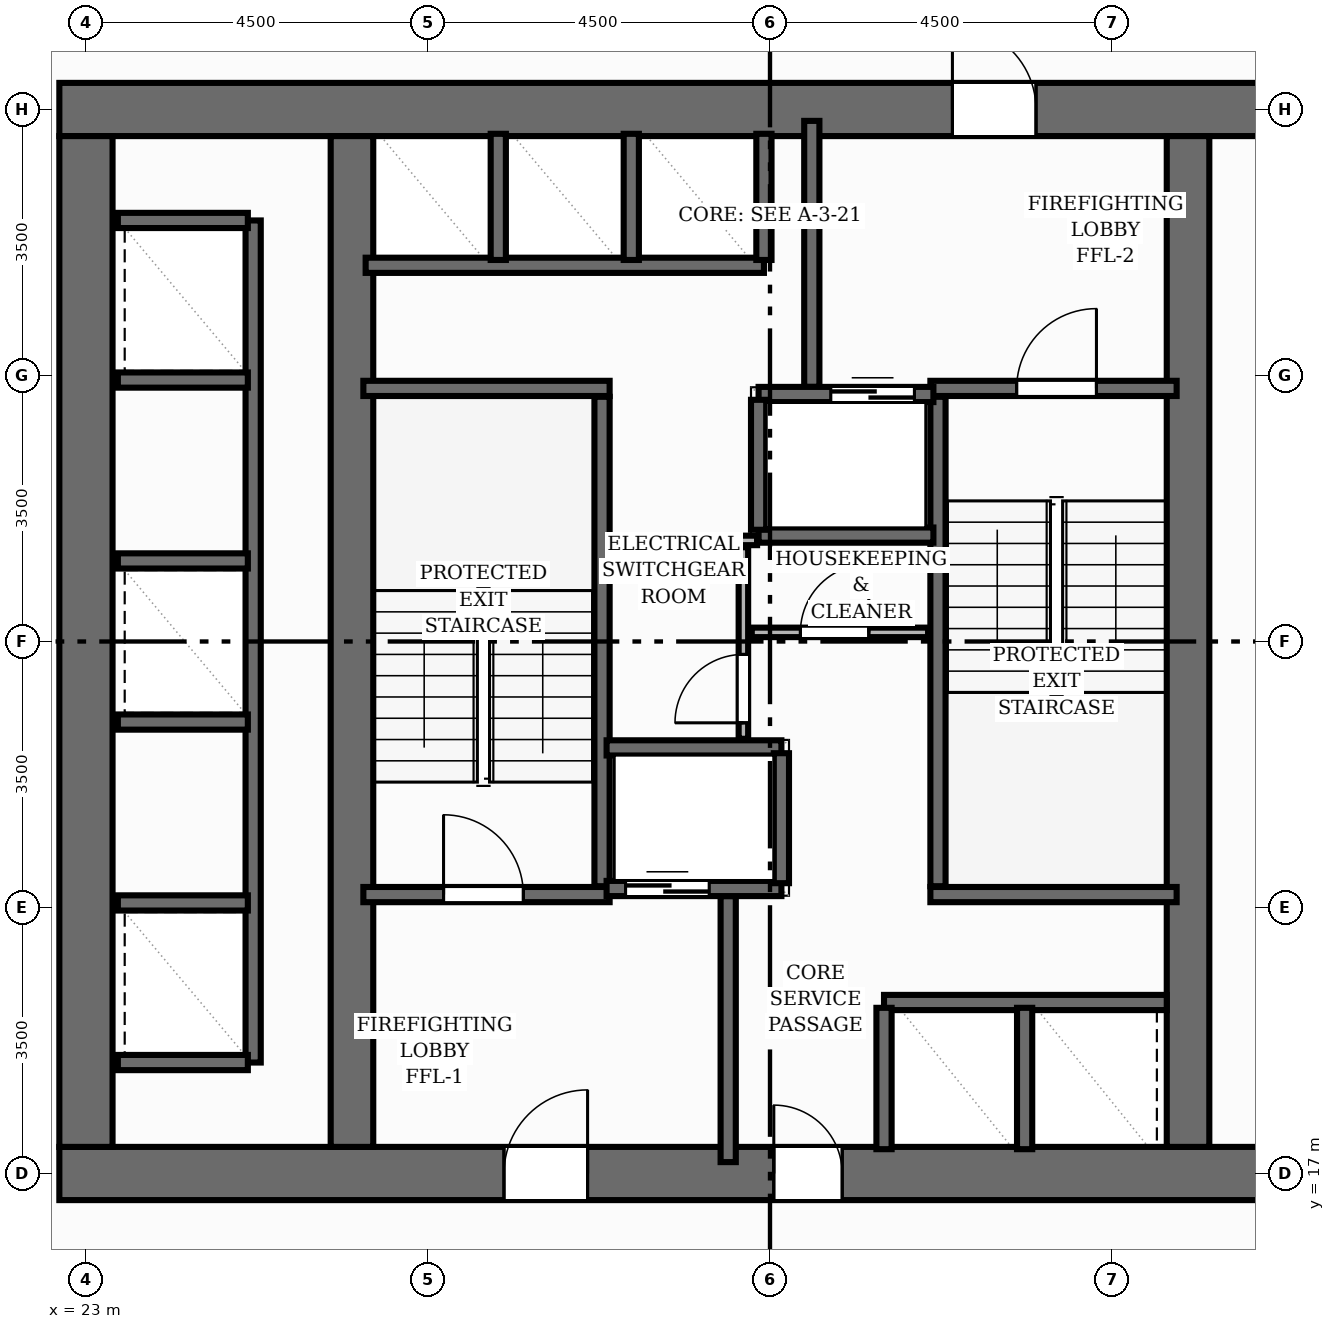
"""IFC4 building model, lengths in metres.
Left out: names, types, materials, properties, quantities, classifications, styles, units other than length and angle.
Written with IfcOpenShell. Run it as: python <this file> out.ifc"""

import sys

from ifc_helpers import new_model, si_unit, direction, frame, frame_2d, origin, place, context, subcontext, project, spatial, rectangle, extrude, element, fill, save


model = new_model("IFC4")
c1 = context("Model", 3, precision=1e-05, world=origin(), true_north=direction((0.0, 1.0)))
c2 = subcontext(c1, "Body", "Model", "MODEL_VIEW")
j1 = project(units=[si_unit("LENGTHUNIT", "METRE"), si_unit("PLANEANGLEUNIT", "RADIAN")], contexts=[c1])
p1 = place(None, origin())
s1 = spatial("IfcSite", under=j1, at=p1, CompositionType="ELEMENT")
p2 = place(p1, origin())
s2 = spatial("IfcBuilding", under=s1, at=p2, CompositionType="ELEMENT")
p3 = place(p2, frame((0.0, 0.0, 77.28)))
s3 = spatial("IfcBuildingStorey", under=s2, at=p3, CompositionType="ELEMENT", Elevation=77.28)
p4 = place(p3, frame((22.65, 17.0, 0.0), z_axis=(0.0, 0.0, 1.0), x_axis=(1.0, 0.0, 0.0)))
e1 = element("IfcWall", 1, at=p4, inside=s3, PredefinedType="SHEAR", context=c2, shape_type="SweptSolid", body=[
    extrude(rectangle(XDim=18.7, YDim=0.7, at=frame_2d((9.35, 0.0))), origin(), (0.0, 0.0, 1.0), 3.2),
])
p5 = place(p4, frame((5.85, 0.0, 0.0)))
e2 = element("IfcOpeningElement", 2, at=p5, cuts=e1, PredefinedType="OPENING", context=c2, shape_type="SweptSolid", body=[
    extrude(rectangle(XDim=1.1, YDim=2.15, at=frame_2d((0.55, 1.075))), frame((0.0, 0.36, 0.0), z_axis=(0.0, -1.0, 0.0), x_axis=(1.0, 0.0, 0.0)), (0.0, 0.0, 1.0), 0.72),
])
p6 = place(p4, frame((9.4, 0.0, 0.0)))
e3 = element("IfcOpeningElement", 3, at=p6, cuts=e1, PredefinedType="OPENING", context=c2, shape_type="SweptSolid", body=[
    extrude(rectangle(XDim=0.9, YDim=2.1, at=frame_2d((0.45, 1.05))), frame((0.0, 0.36, 0.0), z_axis=(0.0, -1.0, 0.0), x_axis=(1.0, 0.0, 0.0)), (0.0, 0.0, 1.0), 0.72),
])
p7 = place(p3, frame((22.65, 31.0, 0.0), z_axis=(0.0, 0.0, 1.0), x_axis=(1.0, 0.0, 0.0)))
e4 = element("IfcWall", 4, at=p7, inside=s3, PredefinedType="SHEAR", context=c2, shape_type="SweptSolid", body=[
    extrude(rectangle(XDim=18.7, YDim=0.7, at=frame_2d((9.35, 0.0))), origin(), (0.0, 0.0, 1.0), 3.2),
])
p8 = place(p7, frame((11.75, 0.0, 0.0)))
e5 = element("IfcOpeningElement", 5, at=p8, cuts=e4, PredefinedType="OPENING", context=c2, shape_type="SweptSolid", body=[
    extrude(rectangle(XDim=1.1, YDim=2.15, at=frame_2d((0.55, 1.075))), frame((0.0, 0.36, 0.0), z_axis=(0.0, -1.0, 0.0), x_axis=(1.0, 0.0, 0.0)), (0.0, 0.0, 1.0), 0.72),
])
p9 = place(p3, frame((23.0, 17.35, 0.0), z_axis=(0.0, 0.0, 1.0), x_axis=(0.0, 1.0, 0.0)))
e6 = element("IfcWall", 6, at=p9, inside=s3, PredefinedType="SHEAR", context=c2, shape_type="SweptSolid", body=[
    extrude(rectangle(XDim=13.3, YDim=0.7, at=frame_2d((6.65, 0.0))), origin(), (0.0, 0.0, 1.0), 3.2),
])
for number, where, z_axis, x_axis in (
    (7, (26.5, 17.35, 0.0), (0.0, 0.0, 1.0), (0.0, 1.0, 0.0)),
    (8, (37.5, 17.35, 0.0), (0.0, 0.0, 1.0), (0.0, 1.0, 0.0)),
):
    element("IfcWall", number, at=place(p3, frame(where, z_axis=z_axis, x_axis=x_axis)), inside=s3, PredefinedType="SHEAR", context=c2, shape_type="SweptSolid", body=[
        extrude(rectangle(XDim=13.3, YDim=0.56, at=frame_2d((6.65, 0.0))), origin(), (0.0, 0.0, 1.0), 3.2),
    ])
p10 = place(p3, frame((29.79, 20.78, 0.0), z_axis=(0.0, 0.0, 1.0), x_axis=(0.0, 1.0, 0.0)))
e9 = element("IfcWall", 9, at=p10, inside=s3, PredefinedType="SHEAR", context=c2, shape_type="SweptSolid", body=[
    extrude(rectangle(XDim=6.44, YDim=0.2, at=frame_2d((3.22, 0.0))), origin(), (0.0, 0.0, 1.0), 3.2),
])
p11 = place(p3, frame((26.65, 27.33, 0.0), z_axis=(0.0, 0.0, 1.0), x_axis=(1.0, 0.0, 0.0)))
e10 = element("IfcWall", 10, at=p11, inside=s3, PredefinedType="SHEAR", context=c2, shape_type="SweptSolid", body=[
    extrude(rectangle(XDim=3.24, YDim=0.2, at=frame_2d((1.62, 0.0))), origin(), (0.0, 0.0, 1.0), 3.2),
])
p12 = place(p3, frame((26.65, 20.67, 0.0), z_axis=(0.0, 0.0, 1.0), x_axis=(1.0, 0.0, 0.0)))
e11 = element("IfcWall", 11, at=p12, inside=s3, PredefinedType="SHEAR", context=c2, shape_type="SweptSolid", body=[
    extrude(rectangle(XDim=3.24, YDim=0.2, at=frame_2d((1.62, 0.0))), origin(), (0.0, 0.0, 1.0), 3.2),
])
p13 = place(p12, frame((1.055, 0.0, 0.0)))
e12 = element("IfcOpeningElement", 12, at=p13, cuts=e11, PredefinedType="OPENING", context=c2, shape_type="SweptSolid", body=[
    extrude(rectangle(XDim=1.05, YDim=2.15, at=frame_2d((0.525, 1.075))), frame((0.0, 0.11, 0.0), z_axis=(0.0, -1.0, 0.0), x_axis=(1.0, 0.0, 0.0)), (0.0, 0.0, 1.0), 0.22),
])
p14 = place(p3, frame((34.21, 20.78, 0.0), z_axis=(0.0, 0.0, 1.0), x_axis=(0.0, 1.0, 0.0)))
e13 = element("IfcWall", 13, at=p14, inside=s3, PredefinedType="SHEAR", context=c2, shape_type="SweptSolid", body=[
    extrude(rectangle(XDim=6.44, YDim=0.2, at=frame_2d((3.22, 0.0))), origin(), (0.0, 0.0, 1.0), 3.2),
])
p15 = place(p3, frame((34.11, 20.67, 0.0), z_axis=(0.0, 0.0, 1.0), x_axis=(1.0, 0.0, 0.0)))
e14 = element("IfcWall", 14, at=p15, inside=s3, PredefinedType="SHEAR", context=c2, shape_type="SweptSolid", body=[
    extrude(rectangle(XDim=3.24, YDim=0.2, at=frame_2d((1.62, 0.0))), origin(), (0.0, 0.0, 1.0), 3.2),
])
p16 = place(p3, frame((34.11, 27.33, 0.0), z_axis=(0.0, 0.0, 1.0), x_axis=(1.0, 0.0, 0.0)))
e15 = element("IfcWall", 15, at=p16, inside=s3, PredefinedType="SHEAR", context=c2, shape_type="SweptSolid", body=[
    extrude(rectangle(XDim=3.24, YDim=0.2, at=frame_2d((1.62, 0.0))), origin(), (0.0, 0.0, 1.0), 3.2),
])
p17 = place(p16, frame((1.135, 0.0, 0.0)))
e16 = element("IfcOpeningElement", 16, at=p17, cuts=e15, PredefinedType="OPENING", context=c2, shape_type="SweptSolid", body=[
    extrude(rectangle(XDim=1.05, YDim=2.15, at=frame_2d((0.525, 1.075))), frame((0.0, 0.11, 0.0), z_axis=(0.0, -1.0, 0.0), x_axis=(1.0, 0.0, 0.0)), (0.0, 0.0, 1.0), 0.22),
])
for number, where, z_axis, x_axis in (
    (17, (31.45, 17.15, 0.0), (0.0, 0.0, 1.0), (0.0, 1.0, 0.0)),
    (18, (32.55, 27.35, 0.0), (0.0, 0.0, 1.0), (0.0, 1.0, 0.0)),
):
    element("IfcWall", number, at=place(p3, frame(where, z_axis=z_axis, x_axis=x_axis)), inside=s3, PredefinedType="SHEAR", context=c2, shape_type="SweptSolid", body=[
        extrude(rectangle(XDim=3.5, YDim=0.2, at=frame_2d((1.75, 0.0))), origin(), (0.0, 0.0, 1.0), 3.2),
    ])
p18 = place(p3, frame((29.85, 20.75, 0.0), z_axis=(0.0, 0.0, 1.0), x_axis=(1.0, 0.0, 0.0)))
e19 = element("IfcWall", 19, at=p18, inside=s3, PredefinedType="SHEAR", context=c2, shape_type="SweptSolid", body=[
    extrude(rectangle(XDim=2.3, YDim=0.2, at=frame_2d((1.15, 0.0))), origin(), (0.0, 0.0, 1.0), 3.2),
])
p19 = place(p18, frame((0.25, 0.0, 0.0)))
e20 = element("IfcOpeningElement", 20, at=p19, cuts=e19, PredefinedType="OPENING", context=c2, shape_type="SweptSolid", body=[
    extrude(rectangle(XDim=1.1, YDim=2.15, at=frame_2d((0.55, 1.075))), frame((0.0, 0.11, 0.0), z_axis=(0.0, -1.0, 0.0), x_axis=(1.0, 0.0, 0.0)), (0.0, 0.0, 1.0), 0.22),
])
p20 = place(p3, frame((29.85, 22.6, 0.0), z_axis=(0.0, 0.0, 1.0), x_axis=(1.0, 0.0, 0.0)))
e21 = element("IfcWall", 21, at=p20, inside=s3, PredefinedType="SHEAR", context=c2, shape_type="SweptSolid", body=[
    extrude(rectangle(XDim=2.3, YDim=0.2, at=frame_2d((1.15, 0.0))), origin(), (0.0, 0.0, 1.0), 3.2),
])
p21 = place(p3, frame((32.15, 20.82, 0.0), z_axis=(0.0, 0.0, 1.0), x_axis=(0.0, 1.0, 0.0)))
e22 = element("IfcWall", 22, at=p21, inside=s3, PredefinedType="SHEAR", context=c2, shape_type="SweptSolid", body=[
    extrude(rectangle(XDim=1.71, YDim=0.2, at=frame_2d((0.855, 0.0))), origin(), (0.0, 0.0, 1.0), 3.2),
])
p22 = place(p3, frame((31.85, 27.25, 0.0), z_axis=(0.0, 0.0, 1.0), x_axis=(1.0, 0.0, 0.0)))
e23 = element("IfcWall", 23, at=p22, inside=s3, PredefinedType="SHEAR", context=c2, shape_type="SweptSolid", body=[
    extrude(rectangle(XDim=2.3, YDim=0.2, at=frame_2d((1.15, 0.0))), origin(), (0.0, 0.0, 1.0), 3.2),
])
p23 = place(p22, frame((0.95, 0.0, 0.0)))
e24 = element("IfcOpeningElement", 24, at=p23, cuts=e23, PredefinedType="OPENING", context=c2, shape_type="SweptSolid", body=[
    extrude(rectangle(XDim=1.1, YDim=2.15, at=frame_2d((0.55, 1.075))), frame((0.0, 0.11, 0.0), z_axis=(0.0, -1.0, 0.0), x_axis=(1.0, 0.0, 0.0)), (0.0, 0.0, 1.0), 0.22),
])
p24 = place(p3, frame((31.85, 25.4, 0.0), z_axis=(0.0, 0.0, 1.0), x_axis=(1.0, 0.0, 0.0)))
e25 = element("IfcWall", 25, at=p24, inside=s3, PredefinedType="SHEAR", context=c2, shape_type="SweptSolid", body=[
    extrude(rectangle(XDim=2.3, YDim=0.2, at=frame_2d((1.15, 0.0))), origin(), (0.0, 0.0, 1.0), 3.2),
])
p25 = place(p3, frame((31.85, 25.47, 0.0), z_axis=(0.0, 0.0, 1.0), x_axis=(0.0, 1.0, 0.0)))
e26 = element("IfcWall", 26, at=p25, inside=s3, PredefinedType="SHEAR", context=c2, shape_type="SweptSolid", body=[
    extrude(rectangle(XDim=1.71, YDim=0.2, at=frame_2d((0.855, 0.0))), origin(), (0.0, 0.0, 1.0), 3.2),
])
p26 = place(p3, frame((25.2, 18.46, 0.0), z_axis=(0.0, 0.0, 1.0), x_axis=(0.0, 1.0, 0.0)))
e27 = element("IfcWall", 27, at=p26, inside=s3, PredefinedType="SHEAR", context=c2, shape_type="SweptSolid", body=[
    extrude(rectangle(XDim=11.08, YDim=0.2, at=frame_2d((5.54, 0.0))), origin(), (0.0, 0.0, 1.0), 3.2),
])
for number, where, z_axis, x_axis in (
    (28, (23.42, 18.46, 0.0), (0.0, 0.0, 1.0), (1.0, 0.0, 0.0)),
    (29, (23.42, 29.54, 0.0), (0.0, 0.0, 1.0), (1.0, 0.0, 0.0)),
    (30, (23.42, 20.56, 0.0), (0.0, 0.0, 1.0), (1.0, 0.0, 0.0)),
    (31, (23.42, 22.94, 0.0), (0.0, 0.0, 1.0), (1.0, 0.0, 0.0)),
    (32, (23.42, 25.06, 0.0), (0.0, 0.0, 1.0), (1.0, 0.0, 0.0)),
    (33, (23.42, 27.44, 0.0), (0.0, 0.0, 1.0), (1.0, 0.0, 0.0)),
):
    element("IfcWall", number, at=place(p3, frame(where, z_axis=z_axis, x_axis=x_axis)), inside=s3, PredefinedType="SHEAR", context=c2, shape_type="SweptSolid", body=[
        extrude(rectangle(XDim=1.71, YDim=0.2, at=frame_2d((0.855, 0.0))), origin(), (0.0, 0.0, 1.0), 3.2),
    ])
p27 = place(p3, frame((26.68, 28.95, 0.0), z_axis=(0.0, 0.0, 1.0), x_axis=(1.0, 0.0, 0.0)))
e34 = element("IfcWall", 34, at=p27, inside=s3, PredefinedType="SHEAR", context=c2, shape_type="SweptSolid", body=[
    extrude(rectangle(XDim=5.24, YDim=0.2, at=frame_2d((2.62, 0.0))), origin(), (0.0, 0.0, 1.0), 3.2),
])
for number, where, z_axis, x_axis in (
    (35, (31.92, 29.02, 0.0), (0.0, 0.0, 1.0), (0.0, 1.0, 0.0)),
    (36, (28.425, 29.02, 0.0), (0.0, 0.0, 1.0), (0.0, 1.0, 0.0)),
    (37, (30.175, 29.02, 0.0), (0.0, 0.0, 1.0), (0.0, 1.0, 0.0)),
):
    element("IfcWall", number, at=place(p3, frame(where, z_axis=z_axis, x_axis=x_axis)), inside=s3, PredefinedType="SHEAR", context=c2, shape_type="SweptSolid", body=[
        extrude(rectangle(XDim=1.66, YDim=0.2, at=frame_2d((0.83, 0.0))), origin(), (0.0, 0.0, 1.0), 3.2),
    ])
p28 = place(p3, frame((33.5, 19.25, 0.0), z_axis=(0.0, 0.0, 1.0), x_axis=(1.0, 0.0, 0.0)))
e38 = element("IfcWall", 38, at=p28, inside=s3, PredefinedType="SHEAR", context=c2, shape_type="SweptSolid", body=[
    extrude(rectangle(XDim=3.72, YDim=0.2, at=frame_2d((1.86, 0.0))), origin(), (0.0, 0.0, 1.0), 3.2),
])
for number, where, z_axis, x_axis in (
    (39, (33.5, 17.32, 0.0), (0.0, 0.0, 1.0), (0.0, 1.0, 0.0)),
    (40, (35.35, 17.32, 0.0), (0.0, 0.0, 1.0), (0.0, 1.0, 0.0)),
):
    element("IfcWall", number, at=place(p3, frame(where, z_axis=z_axis, x_axis=x_axis)), inside=s3, PredefinedType="SHEAR", context=c2, shape_type="SweptSolid", body=[
        extrude(rectangle(XDim=1.86, YDim=0.2, at=frame_2d((0.93, 0.0))), origin(), (0.0, 0.0, 1.0), 3.2),
    ])
p29 = place(p3, frame((31.65, 22.72, 0.0), z_axis=(0.0, 0.0, 1.0), x_axis=(0.0, 1.0, 0.0)))
e41 = element("IfcWall", 41, at=p29, inside=s3, PredefinedType="PARTITIONING", context=c2, shape_type="SweptSolid", body=[
    extrude(rectangle(XDim=2.52, YDim=0.125, at=frame_2d((1.26, 0.0))), origin(), (0.0, 0.0, 1.0), 2.955),
])
p30 = place(p29, frame((0.21, 0.0, 0.0)))
e42 = element("IfcOpeningElement", 42, at=p30, cuts=e41, PredefinedType="OPENING", context=c2, shape_type="SweptSolid", body=[
    extrude(rectangle(XDim=0.9, YDim=2.1, at=frame_2d((0.45, 1.05))), frame((0.0, 0.073, 0.0), z_axis=(0.0, -1.0, 0.0), x_axis=(1.0, 0.0, 0.0)), (0.0, 0.0, 1.0), 0.145),
])
p31 = place(p3, frame((31.76, 24.12, 0.0), z_axis=(0.0, 0.0, 1.0), x_axis=(1.0, 0.0, 0.0)))
e43 = element("IfcWall", 43, at=p31, inside=s3, PredefinedType="PARTITIONING", context=c2, shape_type="SweptSolid", body=[
    extrude(rectangle(XDim=2.32, YDim=0.125, at=frame_2d((1.16, 0.0))), origin(), (0.0, 0.0, 1.0), 2.955),
])
p32 = place(p31, frame((0.64, 0.0, 0.0)))
e44 = element("IfcOpeningElement", 44, at=p32, cuts=e43, PredefinedType="OPENING", context=c2, shape_type="SweptSolid", body=[
    extrude(rectangle(XDim=0.9, YDim=2.1, at=frame_2d((0.45, 1.05))), frame((0.0, 0.073, 0.0), z_axis=(0.0, -1.0, 0.0), x_axis=(1.0, 0.0, 0.0)), (0.0, 0.0, 1.0), 0.145),
])
p33 = place(p3, frame((29.89, 25.33, 0.0), z_axis=(0.0, 0.0, 1.0), x_axis=(1.0, 0.0, 0.0)))
e45 = element("IfcWall", 45, at=p33, inside=s3, PredefinedType="PARTITIONING", context=c2, shape_type="SweptSolid", body=[
    extrude(rectangle(XDim=1.94, YDim=0.125, at=frame_2d((0.97, 0.0))), origin(), (0.0, 0.0, 1.0), 2.955),
])
p34 = place(p13, origin())
e46 = element("IfcDoor", 46, at=p34, inside=s3, OperationType="SINGLE_SWING_LEFT", PredefinedType="DOOR", context=c2, shape_type="SweptSolid", body=[
    extrude(rectangle(XDim=1.05, YDim=2.15, at=frame_2d((0.525, 1.075))), frame((0.0, 0.025, 0.0), z_axis=(0.0, -1.0, 0.0), x_axis=(1.0, 0.0, 0.0)), (0.0, 0.0, 1.0), 0.05),
])
fill(e12, e46)
p35 = place(p17, origin())
e47 = element("IfcDoor", 47, at=p35, inside=s3, OperationType="SINGLE_SWING_RIGHT", PredefinedType="DOOR", context=c2, shape_type="SweptSolid", body=[
    extrude(rectangle(XDim=1.05, YDim=2.15, at=frame_2d((0.525, 1.075))), frame((0.0, 0.025, 0.0), z_axis=(0.0, -1.0, 0.0), x_axis=(1.0, 0.0, 0.0)), (0.0, 0.0, 1.0), 0.05),
])
fill(e16, e47)
p36 = place(p5, origin())
e48 = element("IfcDoor", 48, at=p36, inside=s3, OperationType="SINGLE_SWING_RIGHT", PredefinedType="DOOR", context=c2, shape_type="SweptSolid", body=[
    extrude(rectangle(XDim=1.1, YDim=2.15, at=frame_2d((0.55, 1.075))), frame((0.0, 0.025, 0.0), z_axis=(0.0, -1.0, 0.0), x_axis=(1.0, 0.0, 0.0)), (0.0, 0.0, 1.0), 0.05),
])
fill(e2, e48)
p37 = place(p8, origin())
e49 = element("IfcDoor", 49, at=p37, inside=s3, OperationType="SINGLE_SWING_LEFT", PredefinedType="DOOR", context=c2, shape_type="SweptSolid", body=[
    extrude(rectangle(XDim=1.1, YDim=2.15, at=frame_2d((0.55, 1.075))), frame((0.0, 0.025, 0.0), z_axis=(0.0, -1.0, 0.0), x_axis=(1.0, 0.0, 0.0)), (0.0, 0.0, 1.0), 0.05),
])
fill(e5, e49)
p38 = place(p19, origin())
e50 = element("IfcDoor", 50, at=p38, inside=s3, OperationType="DOUBLE_DOOR_SLIDING", PredefinedType="DOOR", context=c2, shape_type="SweptSolid", body=[
    extrude(rectangle(XDim=1.1, YDim=2.15, at=frame_2d((0.55, 1.075))), frame((0.0, 0.025, 0.0), z_axis=(0.0, -1.0, 0.0), x_axis=(1.0, 0.0, 0.0)), (0.0, 0.0, 1.0), 0.05),
])
fill(e20, e50)
p39 = place(p23, origin())
e51 = element("IfcDoor", 51, at=p39, inside=s3, OperationType="DOUBLE_DOOR_SLIDING", PredefinedType="DOOR", context=c2, shape_type="SweptSolid", body=[
    extrude(rectangle(XDim=1.1, YDim=2.15, at=frame_2d((0.55, 1.075))), frame((0.0, 0.025, 0.0), z_axis=(0.0, -1.0, 0.0), x_axis=(1.0, 0.0, 0.0)), (0.0, 0.0, 1.0), 0.05),
])
fill(e24, e51)
p40 = place(p6, origin())
e52 = element("IfcDoor", 52, at=p40, inside=s3, OperationType="SINGLE_SWING_LEFT", PredefinedType="DOOR", context=c2, shape_type="SweptSolid", body=[
    extrude(rectangle(XDim=0.9, YDim=2.1, at=frame_2d((0.45, 1.05))), frame((0.0, 0.025, 0.0), z_axis=(0.0, -1.0, 0.0), x_axis=(1.0, 0.0, 0.0)), (0.0, 0.0, 1.0), 0.05),
])
fill(e3, e52)
p41 = place(p30, origin())
e53 = element("IfcDoor", 53, at=p41, inside=s3, OperationType="SINGLE_SWING_LEFT", PredefinedType="DOOR", context=c2, shape_type="SweptSolid", body=[
    extrude(rectangle(XDim=0.9, YDim=2.1, at=frame_2d((0.45, 1.05))), frame((0.0, 0.025, 0.0), z_axis=(0.0, -1.0, 0.0), x_axis=(1.0, 0.0, 0.0)), (0.0, 0.0, 1.0), 0.05),
])
fill(e42, e53)
p42 = place(p32, origin())
e54 = element("IfcDoor", 54, at=p42, inside=s3, OperationType="SINGLE_SWING_RIGHT", PredefinedType="DOOR", context=c2, shape_type="SweptSolid", body=[
    extrude(rectangle(XDim=0.9, YDim=2.1, at=frame_2d((0.45, 1.05))), frame((0.0, 0.025, 0.0), z_axis=(0.0, -1.0, 0.0), x_axis=(1.0, 0.0, 0.0)), (0.0, 0.0, 1.0), 0.05),
])
fill(e44, e54)
save(model, sys.argv[1])
